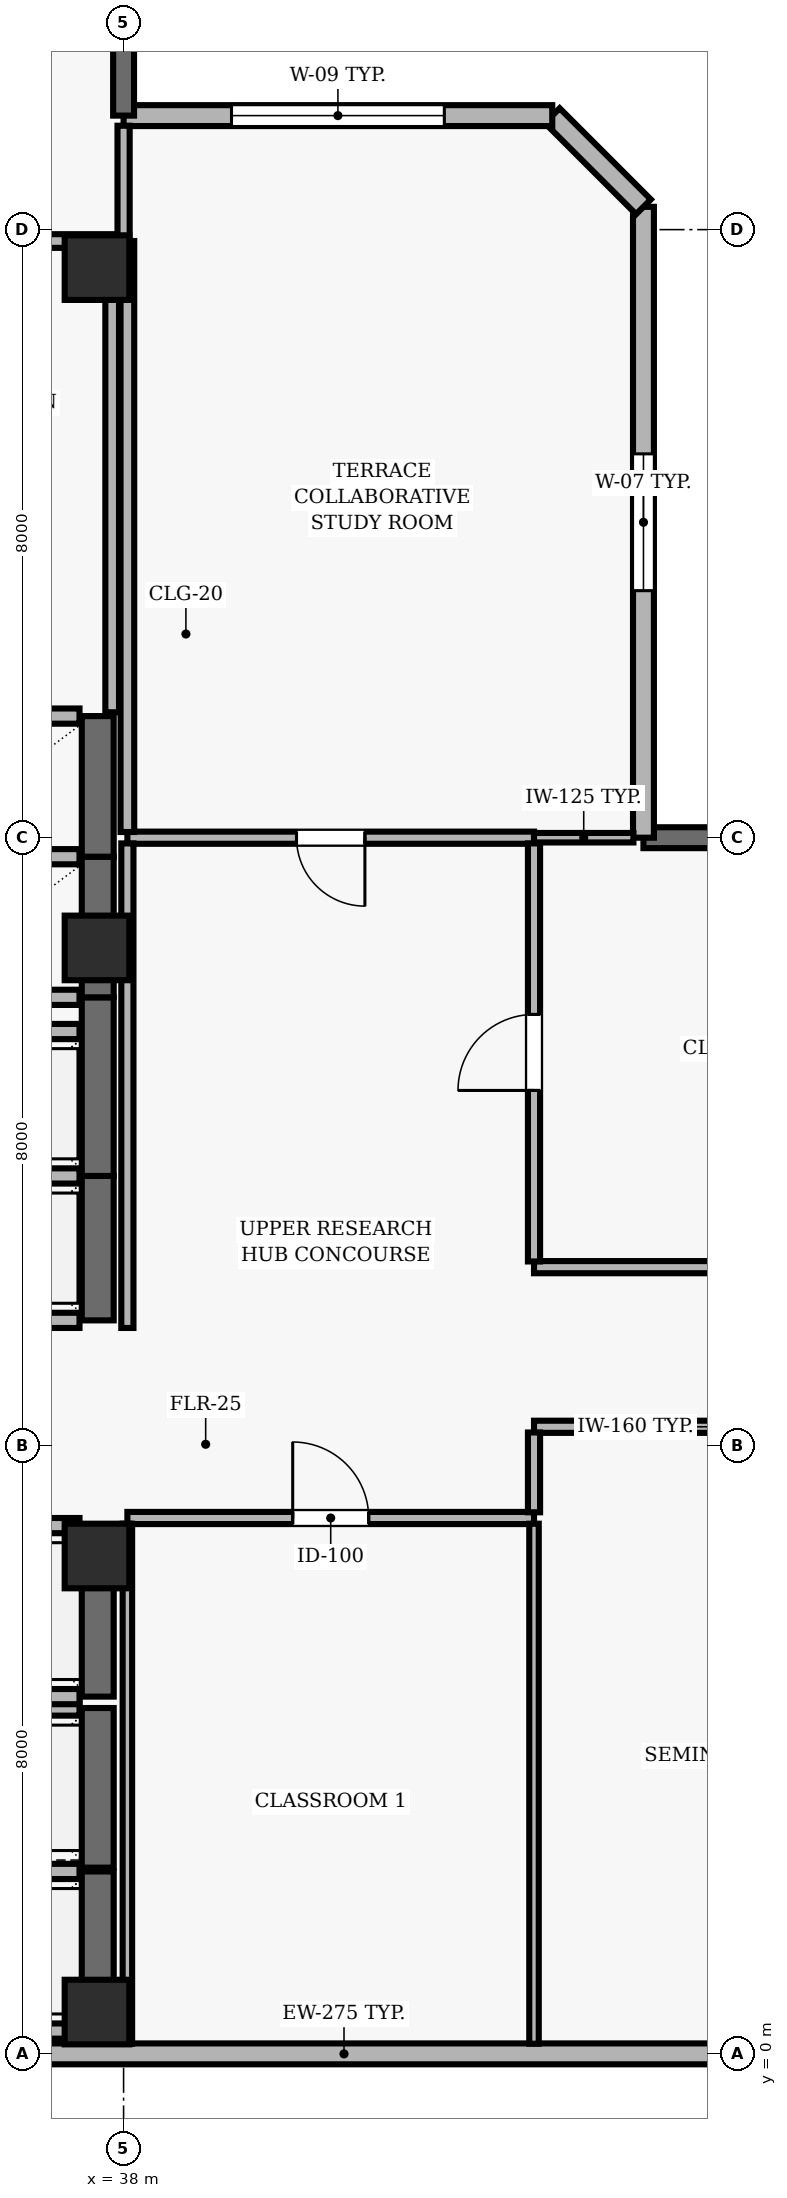
"""IFC4 building model, lengths in metres.
Left out: names, types, materials, properties, quantities, classifications, styles, units other than length and angle.
Written with IfcOpenShell. Run it as: python <this file> out.ifc"""

import sys

from ifc_helpers import new_model, si_unit, direction, frame, frame_2d, origin, origin_2d, place, context, subcontext, project, spatial, rectangle, extrude, element, fill, save


model = new_model("IFC4")
c1 = context("Model", 3, precision=1e-05, world=origin(), true_north=direction((0.0, 1.0)))
c2 = subcontext(c1, "Body", "Model", "MODEL_VIEW")
j1 = project(units=[si_unit("LENGTHUNIT", "METRE"), si_unit("PLANEANGLEUNIT", "RADIAN")], contexts=[c1])
p1 = place(None, origin())
s1 = spatial("IfcSite", under=j1, at=p1, CompositionType="ELEMENT")
p2 = place(p1, origin())
s2 = spatial("IfcBuilding", under=s1, at=p2, CompositionType="ELEMENT")
p3 = place(p2, frame((0.0, 0.0, 252.1)))
s3 = spatial("IfcBuildingStorey", under=s2, at=p3, CompositionType="ELEMENT", Elevation=252.1)
for number, where, z_axis, x_axis in (
    (1, (37.65, 0.55, 0.0), (0.0, 0.0, 1.0), (1.0, 0.0, 0.0)),
    (2, (37.65, 6.55, 0.0), (0.0, 0.0, 1.0), (1.0, 0.0, 0.0)),
    (3, (37.65, 14.55, 0.0), (0.0, 0.0, 1.0), (1.0, 0.0, 0.0)),
    (4, (37.65, 23.5, 0.0), (0.0, 0.0, 1.0), (1.0, 0.0, 0.0)),
):
    element("IfcColumn", number, at=place(p3, frame(where, z_axis=z_axis, x_axis=x_axis)), inside=s3, PredefinedType="COLUMN", context=c2, shape_type="SweptSolid", body=[
        extrude(rectangle(XDim=0.85, YDim=0.85, at=origin_2d()), origin(), (0.0, 0.0, 1.0), 3.9),
    ])
p4 = place(p3, frame((24.5, 0.0, 0.0), z_axis=(0.0, 0.0, 1.0), x_axis=(1.0, 0.0, 0.0)))
e5 = element("IfcWall", 5, at=p4, inside=s3, PredefinedType="SOLIDWALL", context=c2, shape_type="SweptSolid", body=[
    extrude(rectangle(XDim=32.8, YDim=0.275, at=frame_2d((16.4, 0.0))), origin(), (0.0, 0.0, 1.0), 3.69),
])
p5 = place(p4, frame((1.983, 0.0, 0.9)))
e6 = element("IfcOpeningElement", 6, at=p5, cuts=e5, PredefinedType="OPENING", context=c2, shape_type="SweptSolid", body=[
    extrude(rectangle(XDim=1.5, YDim=1.6, at=frame_2d((0.75, 0.8))), frame((0.0, 0.147, 0.0), z_axis=(0.0, -1.0, 0.0), x_axis=(1.0, 0.0, 0.0)), (0.0, 0.0, 1.0), 0.295),
])
p6 = place(p4, frame((8.35, 0.0, 0.9)))
e7 = element("IfcOpeningElement", 7, at=p6, cuts=e5, PredefinedType="OPENING", context=c2, shape_type="SweptSolid", body=[
    extrude(rectangle(XDim=1.5, YDim=1.6, at=frame_2d((0.75, 0.8))), frame((0.0, 0.147, 0.0), z_axis=(0.0, -1.0, 0.0), x_axis=(1.0, 0.0, 0.0)), (0.0, 0.0, 1.0), 0.295),
])
p7 = place(p3, frame((57.3, 16.0, 0.0), z_axis=(0.0, 0.0, 1.0), x_axis=(-1.0, 0.0, 0.0)))
e8 = element("IfcWall", 8, at=p7, inside=s3, PredefinedType="SOLIDWALL", context=c2, shape_type="SweptSolid", body=[
    extrude(rectangle(XDim=12.46, YDim=0.275, at=frame_2d((6.23, 0.0))), origin(), (0.0, 0.0, 1.0), 3.69),
])
p8 = place(p7, frame((1.03, 0.0, 0.0)))
e9 = element("IfcOpeningElement", 9, at=p8, cuts=e8, PredefinedType="OPENING", context=c2, shape_type="SweptSolid", body=[
    extrude(rectangle(XDim=1.0, YDim=2.2, at=frame_2d((0.5, 1.1))), frame((0.0, 0.147, 0.0), z_axis=(0.0, -1.0, 0.0), x_axis=(1.0, 0.0, 0.0)), (0.0, 0.0, 1.0), 0.295),
])
p9 = place(p7, frame((9.045, 0.0, 0.9)))
e10 = element("IfcOpeningElement", 10, at=p9, cuts=e8, PredefinedType="OPENING", context=c2, shape_type="SweptSolid", body=[
    extrude(rectangle(XDim=1.5, YDim=1.8, at=frame_2d((0.75, 0.9))), frame((0.0, 0.147, 0.0), z_axis=(0.0, -1.0, 0.0), x_axis=(1.0, 0.0, 0.0)), (0.0, 0.0, 1.0), 0.295),
])
p10 = place(p3, frame((44.84, 16.0, 0.0), z_axis=(0.0, 0.0, 1.0), x_axis=(0.0, 1.0, 0.0)))
e11 = element("IfcWall", 11, at=p10, inside=s3, PredefinedType="SOLIDWALL", context=c2, shape_type="SweptSolid", body=[
    extrude(rectangle(XDim=8.3, YDim=0.275, at=frame_2d((4.15, 0.0))), origin(), (0.0, 0.0, 1.0), 3.69),
])
p11 = place(p10, frame((3.25, 0.0, 0.9)))
e12 = element("IfcOpeningElement", 12, at=p11, cuts=e11, PredefinedType="OPENING", context=c2, shape_type="SweptSolid", body=[
    extrude(rectangle(XDim=1.8, YDim=1.8, at=frame_2d((0.9, 0.9))), frame((0.0, 0.147, 0.0), z_axis=(0.0, -1.0, 0.0), x_axis=(1.0, 0.0, 0.0)), (0.0, 0.0, 1.0), 0.295),
])
p12 = place(p3, frame((44.84, 24.3, 0.0), z_axis=(0.0, 0.0, 1.0), x_axis=(-0.707178703759, 0.707034851297, 0.0)))
e13 = element("IfcWall", 13, at=p12, inside=s3, PredefinedType="SOLIDWALL", context=c2, shape_type="SweptSolid", body=[
    extrude(rectangle(XDim=1.697, YDim=0.275, at=frame_2d((0.849, 0.0))), origin(), (0.0, 0.0, 1.0), 3.69),
])
p13 = place(p3, frame((43.64, 25.5, 0.0), z_axis=(0.0, 0.0, 1.0), x_axis=(-1.0, 0.0, 0.0)))
e14 = element("IfcWall", 14, at=p13, inside=s3, PredefinedType="SOLIDWALL", context=c2, shape_type="SweptSolid", body=[
    extrude(rectangle(XDim=5.64, YDim=0.275, at=frame_2d((2.82, 0.0))), origin(), (0.0, 0.0, 1.0), 3.69),
])
p14 = place(p13, frame((1.42, 0.0, 0.9)))
e15 = element("IfcOpeningElement", 15, at=p14, cuts=e14, PredefinedType="OPENING", context=c2, shape_type="SweptSolid", body=[
    extrude(rectangle(XDim=2.8, YDim=1.8, at=frame_2d((1.4, 0.9))), frame((0.0, 0.147, 0.0), z_axis=(0.0, -1.0, 0.0), x_axis=(1.0, 0.0, 0.0)), (0.0, 0.0, 1.0), 0.295),
])
p15 = place(p3, frame((38.0, 25.5, 0.0), z_axis=(0.0, 0.0, 1.0), x_axis=(0.0, 1.0, 0.0)))
e16 = element("IfcWall", 16, at=p15, inside=s3, PredefinedType="SOLIDWALL", context=c2, shape_type="SweptSolid", body=[
    extrude(rectangle(XDim=9.8, YDim=0.275, at=frame_2d((4.9, 0.0))), origin(), (0.0, 0.0, 1.0), 3.69),
])
p16 = place(p15, frame((6.7, 0.0, 0.0)))
e17 = element("IfcOpeningElement", 17, at=p16, cuts=e16, PredefinedType="OPENING", context=c2, shape_type="SweptSolid", body=[
    extrude(rectangle(XDim=1.0, YDim=2.2, at=frame_2d((0.5, 1.1))), frame((0.0, 0.147, 0.0), z_axis=(0.0, -1.0, 0.0), x_axis=(1.0, 0.0, 0.0)), (0.0, 0.0, 1.0), 0.295),
])
p17 = place(p3, frame((37.66, 0.3, 0.0), z_axis=(0.0, 0.0, 1.0), x_axis=(0.0, 1.0, 0.0)))
e18 = element("IfcWall", 18, at=p17, inside=s3, PredefinedType="SHEAR", context=c2, shape_type="SweptSolid", body=[
    extrude(rectangle(XDim=2.1, YDim=0.42, at=frame_2d((1.05, 0.0))), origin(), (0.0, 0.0, 1.0), 3.69),
])
for number, where, z_axis, x_axis in (
    (19, (35.28, 0.3, 0.0), (0.0, 0.0, 1.0), (1.0, 0.0, 0.0)),
    (20, (37.42, 2.4, 0.0), (0.0, 0.0, 1.0), (-1.0, 0.0, 0.0)),
):
    element("IfcWall", number, at=place(p3, frame(where, z_axis=z_axis, x_axis=x_axis)), inside=s3, PredefinedType="SOLIDWALL", context=c2, shape_type="SweptSolid", body=[
        extrude(rectangle(XDim=2.14, YDim=0.2, at=frame_2d((1.07, 0.0))), origin(), (0.0, 0.0, 1.0), 3.69),
    ])
p18 = place(p3, frame((37.66, 2.45, 0.0), z_axis=(0.0, 0.0, 1.0), x_axis=(0.0, 1.0, 0.0)))
e21 = element("IfcWall", 21, at=p18, inside=s3, PredefinedType="SHEAR", context=c2, shape_type="SweptSolid", body=[
    extrude(rectangle(XDim=2.1, YDim=0.42, at=frame_2d((1.05, 0.0))), origin(), (0.0, 0.0, 1.0), 3.69),
])
p19 = place(p3, frame((37.42, 4.55, 0.0), z_axis=(0.0, 0.0, 1.0), x_axis=(-1.0, 0.0, 0.0)))
e22 = element("IfcWall", 22, at=p19, inside=s3, PredefinedType="SOLIDWALL", context=c2, shape_type="SweptSolid", body=[
    extrude(rectangle(XDim=2.14, YDim=0.2, at=frame_2d((1.07, 0.0))), origin(), (0.0, 0.0, 1.0), 3.69),
])
p20 = place(p3, frame((37.66, 4.7, 0.0), z_axis=(0.0, 0.0, 1.0), x_axis=(0.0, 1.0, 0.0)))
e23 = element("IfcWall", 23, at=p20, inside=s3, PredefinedType="SHEAR", context=c2, shape_type="SweptSolid", body=[
    extrude(rectangle(XDim=2.25, YDim=0.42, at=frame_2d((1.125, 0.0))), origin(), (0.0, 0.0, 1.0), 3.69),
])
for number, where, z_axis, x_axis in (
    (24, (35.28, 4.7, 0.0), (0.0, 0.0, 1.0), (1.0, 0.0, 0.0)),
    (25, (37.42, 6.95, 0.0), (0.0, 0.0, 1.0), (-1.0, 0.0, 0.0)),
):
    element("IfcWall", number, at=place(p3, frame(where, z_axis=z_axis, x_axis=x_axis)), inside=s3, PredefinedType="SOLIDWALL", context=c2, shape_type="SweptSolid", body=[
        extrude(rectangle(XDim=2.14, YDim=0.2, at=frame_2d((1.07, 0.0))), origin(), (0.0, 0.0, 1.0), 3.69),
    ])
p21 = place(p3, frame((37.66, 9.65, 0.0), z_axis=(0.0, 0.0, 1.0), x_axis=(0.0, 1.0, 0.0)))
e26 = element("IfcWall", 26, at=p21, inside=s3, PredefinedType="SHEAR", context=c2, shape_type="SweptSolid", body=[
    extrude(rectangle(XDim=1.9, YDim=0.42, at=frame_2d((0.95, 0.0))), origin(), (0.0, 0.0, 1.0), 3.69),
])
for number, where, z_axis, x_axis in (
    (27, (35.28, 9.65, 0.0), (0.0, 0.0, 1.0), (1.0, 0.0, 0.0)),
    (28, (37.42, 11.55, 0.0), (0.0, 0.0, 1.0), (-1.0, 0.0, 0.0)),
):
    element("IfcWall", number, at=place(p3, frame(where, z_axis=z_axis, x_axis=x_axis)), inside=s3, PredefinedType="SOLIDWALL", context=c2, shape_type="SweptSolid", body=[
        extrude(rectangle(XDim=2.14, YDim=0.2, at=frame_2d((1.07, 0.0))), origin(), (0.0, 0.0, 1.0), 3.69),
    ])
p22 = place(p3, frame((37.66, 11.55, 0.0), z_axis=(0.0, 0.0, 1.0), x_axis=(0.0, 1.0, 0.0)))
e29 = element("IfcWall", 29, at=p22, inside=s3, PredefinedType="SHEAR", context=c2, shape_type="SweptSolid", body=[
    extrude(rectangle(XDim=2.35, YDim=0.42, at=frame_2d((1.175, 0.0))), origin(), (0.0, 0.0, 1.0), 3.69),
])
p23 = place(p3, frame((37.42, 13.45, 0.0), z_axis=(0.0, 0.0, 1.0), x_axis=(-1.0, 0.0, 0.0)))
e30 = element("IfcWall", 30, at=p23, inside=s3, PredefinedType="SOLIDWALL", context=c2, shape_type="SweptSolid", body=[
    extrude(rectangle(XDim=2.14, YDim=0.2, at=frame_2d((1.07, 0.0))), origin(), (0.0, 0.0, 1.0), 3.69),
])
p24 = place(p3, frame((37.66, 13.9, 0.0), z_axis=(0.0, 0.0, 1.0), x_axis=(0.0, 1.0, 0.0)))
e31 = element("IfcWall", 31, at=p24, inside=s3, PredefinedType="SHEAR", context=c2, shape_type="SweptSolid", body=[
    extrude(rectangle(XDim=1.85, YDim=0.42, at=frame_2d((0.925, 0.0))), origin(), (0.0, 0.0, 1.0), 3.69),
])
for number, where, z_axis, x_axis in (
    (32, (35.28, 13.9, 0.0), (0.0, 0.0, 1.0), (1.0, 0.0, 0.0)),
    (33, (37.42, 15.75, 0.0), (0.0, 0.0, 1.0), (-1.0, 0.0, 0.0)),
):
    element("IfcWall", number, at=place(p3, frame(where, z_axis=z_axis, x_axis=x_axis)), inside=s3, PredefinedType="SOLIDWALL", context=c2, shape_type="SweptSolid", body=[
        extrude(rectangle(XDim=2.14, YDim=0.2, at=frame_2d((1.07, 0.0))), origin(), (0.0, 0.0, 1.0), 3.69),
    ])
p25 = place(p3, frame((37.66, 15.75, 0.0), z_axis=(0.0, 0.0, 1.0), x_axis=(0.0, 1.0, 0.0)))
e34 = element("IfcWall", 34, at=p25, inside=s3, PredefinedType="SHEAR", context=c2, shape_type="SweptSolid", body=[
    extrude(rectangle(XDim=1.85, YDim=0.42, at=frame_2d((0.925, 0.0))), origin(), (0.0, 0.0, 1.0), 3.69),
])
p26 = place(p3, frame((37.42, 17.6, 0.0), z_axis=(0.0, 0.0, 1.0), x_axis=(-1.0, 0.0, 0.0)))
e35 = element("IfcWall", 35, at=p26, inside=s3, PredefinedType="SOLIDWALL", context=c2, shape_type="SweptSolid", body=[
    extrude(rectangle(XDim=2.14, YDim=0.2, at=frame_2d((1.07, 0.0))), origin(), (0.0, 0.0, 1.0), 3.69),
])
p27 = place(p3, frame((37.85, 23.85, 0.0), z_axis=(0.0, 0.0, 1.0), x_axis=(-1.0, 0.0, 0.0)))
e36 = element("IfcWall", 36, at=p27, inside=s3, PredefinedType="PARTITIONING", context=c2, shape_type="SweptSolid", body=[
    extrude(rectangle(XDim=4.0, YDim=0.18, at=frame_2d((2.0, 0.0))), origin(), (0.0, 0.0, 1.0), 3.227),
])
p28 = place(p3, frame((38.05, 7.05, 0.0), z_axis=(0.0, 0.0, 1.0), x_axis=(1.0, 0.0, 0.0)))
e37 = element("IfcWall", 37, at=p28, inside=s3, PredefinedType="PARTITIONING", context=c2, shape_type="SweptSolid", body=[
    extrude(rectangle(XDim=5.35, YDim=0.16, at=frame_2d((2.675, 0.0))), origin(), (0.0, 0.0, 1.0), 3.69),
])
p29 = place(p28, frame((2.175, 0.0, 0.0)))
e38 = element("IfcOpeningElement", 38, at=p29, cuts=e37, PredefinedType="OPENING", context=c2, shape_type="SweptSolid", body=[
    extrude(rectangle(XDim=1.0, YDim=2.1, at=frame_2d((0.5, 1.05))), frame((0.0, 0.09, 0.0), z_axis=(0.0, -1.0, 0.0), x_axis=(1.0, 0.0, 0.0)), (0.0, 0.0, 1.0), 0.18),
])
p30 = place(p3, frame((43.4, 8.25, 0.0), z_axis=(0.0, 0.0, 1.0), x_axis=(1.0, 0.0, 0.0)))
e39 = element("IfcWall", 39, at=p30, inside=s3, PredefinedType="PARTITIONING", context=c2, shape_type="SweptSolid", body=[
    extrude(rectangle(XDim=5.41, YDim=0.16, at=frame_2d((2.705, 0.0))), origin(), (0.0, 0.0, 1.0), 3.227),
])
p31 = place(p30, frame((3.655, 0.0, 0.0)))
e40 = element("IfcOpeningElement", 40, at=p31, cuts=e39, PredefinedType="OPENING", context=c2, shape_type="SweptSolid", body=[
    extrude(rectangle(XDim=0.9, YDim=2.1, at=frame_2d((0.45, 1.05))), frame((0.0, 0.09, 0.0), z_axis=(0.0, -1.0, 0.0), x_axis=(1.0, 0.0, 0.0)), (0.0, 0.0, 1.0), 0.18),
])
p32 = place(p3, frame((43.4, 16.0, 0.0), z_axis=(0.0, 0.0, 1.0), x_axis=(-1.0, 0.0, 0.0)))
e41 = element("IfcWall", 41, at=p32, inside=s3, PredefinedType="PARTITIONING", context=c2, shape_type="SweptSolid", body=[
    extrude(rectangle(XDim=5.35, YDim=0.16, at=frame_2d((2.675, 0.0))), origin(), (0.0, 0.0, 1.0), 3.39),
])
p33 = place(p32, frame((2.225, 0.0, 0.0)))
e42 = element("IfcOpeningElement", 42, at=p33, cuts=e41, PredefinedType="OPENING", context=c2, shape_type="SweptSolid", body=[
    extrude(rectangle(XDim=0.9, YDim=2.1, at=frame_2d((0.45, 1.05))), frame((0.0, 0.09, 0.0), z_axis=(0.0, -1.0, 0.0), x_axis=(1.0, 0.0, 0.0)), (0.0, 0.0, 1.0), 0.18),
])
p34 = place(p3, frame((43.4, 16.0, 0.0), z_axis=(0.0, 0.0, 1.0), x_axis=(1.0, 0.0, 0.0)))
e43 = element("IfcWall", 43, at=p34, inside=s3, PredefinedType="PARTITIONING", context=c2, shape_type="SweptSolid", body=[
    extrude(rectangle(XDim=1.308, YDim=0.125, at=frame_2d((0.654, 0.0))), origin(), (0.0, 0.0, 1.0), 3.39),
])
p35 = place(p3, frame((48.81, 10.35, 0.0), z_axis=(0.0, 0.0, 1.0), x_axis=(-1.0, 0.0, 0.0)))
e44 = element("IfcWall", 44, at=p35, inside=s3, PredefinedType="PARTITIONING", context=c2, shape_type="SweptSolid", body=[
    extrude(rectangle(XDim=5.41, YDim=0.16, at=frame_2d((2.705, 0.0))), origin(), (0.0, 0.0, 1.0), 3.424),
])
p36 = place(p3, frame((37.85, 17.65, 0.0), z_axis=(0.0, 0.0, 1.0), x_axis=(0.0, 1.0, 0.0)))
e45 = element("IfcWall", 45, at=p36, inside=s3, PredefinedType="PARTITIONING", context=c2, shape_type="SweptSolid", body=[
    extrude(rectangle(XDim=6.115, YDim=0.18, at=frame_2d((3.058, 0.0))), origin(), (0.0, 0.0, 1.0), 3.227),
])
p37 = place(p3, frame((38.0, 23.85, 0.0), z_axis=(0.0, 0.0, 1.0), x_axis=(0.0, 1.0, 0.0)))
e46 = element("IfcWall", 46, at=p37, inside=s3, PredefinedType="PARTITIONING", context=c2, shape_type="SweptSolid", body=[
    extrude(rectangle(XDim=1.517, YDim=0.16, at=frame_2d((0.758, 0.0))), origin(), (0.0, 0.0, 1.0), 3.227),
])
p38 = place(p3, frame((38.05, 6.975, 0.0), z_axis=(0.0, 0.0, 1.0), x_axis=(0.0, -1.0, 0.0)))
e47 = element("IfcWall", 47, at=p38, inside=s3, PredefinedType="PARTITIONING", context=c2, shape_type="SweptSolid", body=[
    extrude(rectangle(XDim=6.842, YDim=0.125, at=frame_2d((3.421, 0.0))), origin(), (0.0, 0.0, 1.0), 3.227),
])
p39 = place(p3, frame((38.05, 15.925, 0.0), z_axis=(0.0, 0.0, 1.0), x_axis=(0.0, -1.0, 0.0)))
e48 = element("IfcWall", 48, at=p39, inside=s3, PredefinedType="PARTITIONING", context=c2, shape_type="SweptSolid", body=[
    extrude(rectangle(XDim=6.375, YDim=0.16, at=frame_2d((3.188, 0.0))), origin(), (0.0, 0.0, 1.0), 3.227),
])
p40 = place(p3, frame((38.05, 23.85, 0.0), z_axis=(0.0, 0.0, 1.0), x_axis=(0.0, -1.0, 0.0)))
e49 = element("IfcWall", 49, at=p40, inside=s3, PredefinedType="PARTITIONING", context=c2, shape_type="SweptSolid", body=[
    extrude(rectangle(XDim=7.775, YDim=0.18, at=frame_2d((3.888, 0.0))), origin(), (0.0, 0.0, 1.0), 3.227),
])
p41 = place(p3, frame((43.4, 0.133, 0.0), z_axis=(0.0, 0.0, 1.0), x_axis=(0.0, 1.0, 0.0)))
e50 = element("IfcWall", 50, at=p41, inside=s3, PredefinedType="PARTITIONING", context=c2, shape_type="SweptSolid", body=[
    extrude(rectangle(XDim=6.842, YDim=0.125, at=frame_2d((3.421, 0.0))), origin(), (0.0, 0.0, 1.0), 3.69),
])
p42 = place(p3, frame((43.4, 7.125, 0.0), z_axis=(0.0, 0.0, 1.0), x_axis=(0.0, 1.0, 0.0)))
e51 = element("IfcWall", 51, at=p42, inside=s3, PredefinedType="PARTITIONING", context=c2, shape_type="SweptSolid", body=[
    extrude(rectangle(XDim=1.05, YDim=0.16, at=frame_2d((0.525, 0.0))), origin(), (0.0, 0.0, 1.0), 3.69),
])
p43 = place(p3, frame((43.4, 10.425, 0.0), z_axis=(0.0, 0.0, 1.0), x_axis=(0.0, 1.0, 0.0)))
e52 = element("IfcWall", 52, at=p43, inside=s3, PredefinedType="PARTITIONING", context=c2, shape_type="SweptSolid", body=[
    extrude(rectangle(XDim=5.5, YDim=0.16, at=frame_2d((2.75, 0.0))), origin(), (0.0, 0.0, 1.0), 3.69),
])
p44 = place(p43, frame((2.25, 0.0, 0.0)))
e53 = element("IfcOpeningElement", 53, at=p44, cuts=e52, PredefinedType="OPENING", context=c2, shape_type="SweptSolid", body=[
    extrude(rectangle(XDim=1.0, YDim=2.1, at=frame_2d((0.5, 1.05))), frame((0.0, 0.09, 0.0), z_axis=(0.0, -1.0, 0.0), x_axis=(1.0, 0.0, 0.0)), (0.0, 0.0, 1.0), 0.18),
])
p45 = place(p11, origin())
e54 = element("IfcWindow", 54, at=p45, inside=s3, PartitioningType="SINGLE_PANEL", PredefinedType="WINDOW", context=c2, shape_type="SweptSolid", body=[
    extrude(rectangle(XDim=1.8, YDim=1.8, at=frame_2d((0.9, 0.9))), frame((0.0, 0.03, 0.0), z_axis=(0.0, -1.0, 0.0), x_axis=(1.0, 0.0, 0.0)), (0.0, 0.0, 1.0), 0.06),
])
fill(e12, e54)
p46 = place(p14, origin())
e55 = element("IfcWindow", 55, at=p46, inside=s3, PartitioningType="SINGLE_PANEL", PredefinedType="WINDOW", context=c2, shape_type="SweptSolid", body=[
    extrude(rectangle(XDim=2.8, YDim=1.8, at=frame_2d((1.4, 0.9))), frame((0.0, 0.03, 0.0), z_axis=(0.0, -1.0, 0.0), x_axis=(1.0, 0.0, 0.0)), (0.0, 0.0, 1.0), 0.06),
])
fill(e15, e55)
p47 = place(p29, origin())
e56 = element("IfcDoor", 56, at=p47, inside=s3, OperationType="SINGLE_SWING_LEFT", PredefinedType="DOOR", context=c2, shape_type="SweptSolid", body=[
    extrude(rectangle(XDim=1.0, YDim=2.1, at=frame_2d((0.5, 1.05))), frame((0.0, 0.025, 0.0), z_axis=(0.0, -1.0, 0.0), x_axis=(1.0, 0.0, 0.0)), (0.0, 0.0, 1.0), 0.05),
])
fill(e38, e56)
p48 = place(p44, origin())
e57 = element("IfcDoor", 57, at=p48, inside=s3, OperationType="SINGLE_SWING_LEFT", PredefinedType="DOOR", context=c2, shape_type="SweptSolid", body=[
    extrude(rectangle(XDim=1.0, YDim=2.1, at=frame_2d((0.5, 1.05))), frame((0.0, 0.025, 0.0), z_axis=(0.0, -1.0, 0.0), x_axis=(1.0, 0.0, 0.0)), (0.0, 0.0, 1.0), 0.05),
])
fill(e53, e57)
p49 = place(p33, origin())
e58 = element("IfcDoor", 58, at=p49, inside=s3, OperationType="SINGLE_SWING_LEFT", PredefinedType="DOOR", context=c2, shape_type="SweptSolid", body=[
    extrude(rectangle(XDim=0.9, YDim=2.1, at=frame_2d((0.45, 1.05))), frame((0.0, 0.025, 0.0), z_axis=(0.0, -1.0, 0.0), x_axis=(1.0, 0.0, 0.0)), (0.0, 0.0, 1.0), 0.05),
])
fill(e42, e58)
save(model, sys.argv[1])
